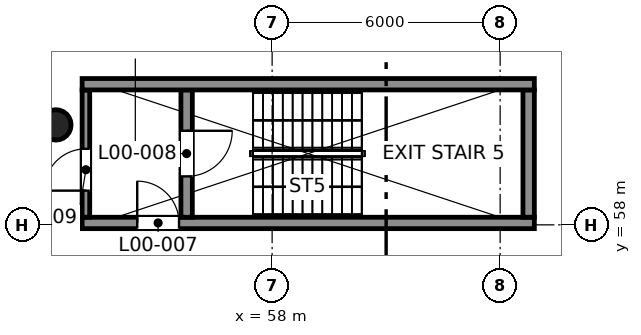
"""IFC4 building model, lengths in metres.
Left out: names, types, materials, properties, quantities, classifications, styles, units other than length and angle.
Written with IfcOpenShell. Run it as: python <this file> out.ifc"""

import sys

from ifc_helpers import new_model, si_unit, direction, frame, frame_2d, origin, origin_2d, place, context, subcontext, project, spatial, rectangle, circle, extrude, element, fill, save


model = new_model("IFC4")
c1 = context("Model", 3, precision=1e-05, world=origin(), true_north=direction((0.0, 1.0)))
c2 = subcontext(c1, "Body", "Model", "MODEL_VIEW")
j1 = project(units=[si_unit("LENGTHUNIT", "METRE"), si_unit("PLANEANGLEUNIT", "RADIAN")], contexts=[c1])
p1 = place(None, origin())
s1 = spatial("IfcSite", under=j1, at=p1, CompositionType="ELEMENT")
p2 = place(p1, origin())
s2 = spatial("IfcBuilding", under=s1, at=p2, CompositionType="ELEMENT")
p3 = place(p2, origin())
s3 = spatial("IfcBuildingStorey", under=s2, at=p3, CompositionType="ELEMENT", Elevation=0.0)
p4 = place(p3, frame((52.31, 60.63, 0.0), z_axis=(0.0, 0.0, 1.0), x_axis=(1.0, 0.0, 0.0)))
e1 = element("IfcColumn", 1, at=p4, inside=s3, PredefinedType="COLUMN", context=c2, shape_type="SweptSolid", body=[
    extrude(circle(Radius=0.4, at=origin_2d()), origin(), (0.0, 0.0, 1.0), 9.0),
])
p5 = place(p3, frame((53.0, 58.05, 0.0), z_axis=(0.0, 0.0, 1.0), x_axis=(1.0, 0.0, 0.0)))
e2 = element("IfcWall", 2, at=p5, inside=s3, PredefinedType="SHEAR", context=c2, shape_type="SweptSolid", body=[
    extrude(rectangle(XDim=11.9, YDim=0.3, at=frame_2d((5.95, 0.0))), origin(), (0.0, 0.0, 1.0), 9.0),
])
p6 = place(p5, frame((1.45, 0.0, 0.0)))
e3 = element("IfcOpeningElement", 3, at=p6, cuts=e2, PredefinedType="OPENING", context=c2, shape_type="SweptSolid", body=[
    extrude(rectangle(XDim=1.1, YDim=2.1, at=frame_2d((0.55, 1.05))), frame((0.0, 0.16, 0.0), z_axis=(0.0, -1.0, 0.0), x_axis=(1.0, 0.0, 0.0)), (0.0, 0.0, 1.0), 0.32),
])
p7 = place(p3, frame((53.1, 58.2, 0.0), z_axis=(0.0, 0.0, 1.0), x_axis=(0.0, 1.0, 0.0)))
e4 = element("IfcWall", 4, at=p7, inside=s3, PredefinedType="SHEAR", context=c2, shape_type="SweptSolid", body=[
    extrude(rectangle(XDim=3.35, YDim=0.2, at=frame_2d((1.675, 0.0))), origin(), (0.0, 0.0, 1.0), 9.0),
])
p8 = place(p7, frame((0.7, 0.0, 0.0)))
e5 = element("IfcOpeningElement", 5, at=p8, cuts=e4, PredefinedType="OPENING", context=c2, shape_type="SweptSolid", body=[
    extrude(rectangle(XDim=1.1, YDim=2.1, at=frame_2d((0.55, 1.05))), frame((0.0, 0.11, 0.0), z_axis=(0.0, -1.0, 0.0), x_axis=(1.0, 0.0, 0.0)), (0.0, 0.0, 1.0), 0.22),
])
p9 = place(p3, frame((55.75, 58.2, 0.0), z_axis=(0.0, 0.0, 1.0), x_axis=(0.0, 1.0, 0.0)))
e6 = element("IfcWall", 6, at=p9, inside=s3, PredefinedType="SHEAR", context=c2, shape_type="SweptSolid", body=[
    extrude(rectangle(XDim=3.35, YDim=0.3, at=frame_2d((1.675, 0.0))), origin(), (0.0, 0.0, 1.0), 9.0),
])
p10 = place(p9, frame((1.075, 0.0, 0.0)))
e7 = element("IfcOpeningElement", 7, at=p10, cuts=e6, PredefinedType="OPENING", context=c2, shape_type="SweptSolid", body=[
    extrude(rectangle(XDim=1.2, YDim=2.1, at=frame_2d((0.6, 1.05))), frame((0.0, 0.16, 0.0), z_axis=(0.0, -1.0, 0.0), x_axis=(1.0, 0.0, 0.0)), (0.0, 0.0, 1.0), 0.32),
])
p11 = place(p3, frame((64.75, 58.2, 0.0), z_axis=(0.0, 0.0, 1.0), x_axis=(0.0, 1.0, 0.0)))
e8 = element("IfcWall", 8, at=p11, inside=s3, PredefinedType="SHEAR", context=c2, shape_type="SweptSolid", body=[
    extrude(rectangle(XDim=3.35, YDim=0.3, at=frame_2d((1.675, 0.0))), origin(), (0.0, 0.0, 1.0), 9.0),
])
p12 = place(p3, frame((53.0, 61.7, 0.0), z_axis=(0.0, 0.0, 1.0), x_axis=(1.0, 0.0, 0.0)))
e9 = element("IfcWall", 9, at=p12, inside=s3, PredefinedType="SHEAR", context=c2, shape_type="SweptSolid", body=[
    extrude(rectangle(XDim=11.9, YDim=0.3, at=frame_2d((5.95, 0.0))), origin(), (0.0, 0.0, 1.0), 9.0),
])
p13 = place(p6, origin())
e10 = element("IfcDoor", 10, at=p13, inside=s3, OperationType="SINGLE_SWING_LEFT", PredefinedType="DOOR", context=c2, shape_type="SweptSolid", body=[
    extrude(rectangle(XDim=1.1, YDim=2.1, at=frame_2d((0.55, 1.05))), frame((0.0, 0.025, 0.0), z_axis=(0.0, -1.0, 0.0), x_axis=(1.0, 0.0, 0.0)), (0.0, 0.0, 1.0), 0.05),
])
fill(e3, e10)
p14 = place(p10, frame((1.2, 0.0, 0.0), z_axis=(0.0, 0.0, 1.0), x_axis=(-1.0, 0.0, 0.0)))
e11 = element("IfcDoor", 11, at=p14, inside=s3, OperationType="SINGLE_SWING_LEFT", PredefinedType="DOOR", context=c2, shape_type="SweptSolid", body=[
    extrude(rectangle(XDim=1.2, YDim=2.1, at=frame_2d((0.6, 1.05))), frame((0.0, 0.025, 0.0), z_axis=(0.0, -1.0, 0.0), x_axis=(1.0, 0.0, 0.0)), (0.0, 0.0, 1.0), 0.05),
])
fill(e7, e11)
p15 = place(p8, origin())
e12 = element("IfcDoor", 12, at=p15, inside=s3, OperationType="SINGLE_SWING_LEFT", PredefinedType="DOOR", context=c2, shape_type="SweptSolid", body=[
    extrude(rectangle(XDim=1.1, YDim=2.1, at=frame_2d((0.55, 1.05))), frame((0.0, 0.025, 0.0), z_axis=(0.0, -1.0, 0.0), x_axis=(1.0, 0.0, 0.0)), (0.0, 0.0, 1.0), 0.05),
])
fill(e5, e12)
save(model, sys.argv[1])
